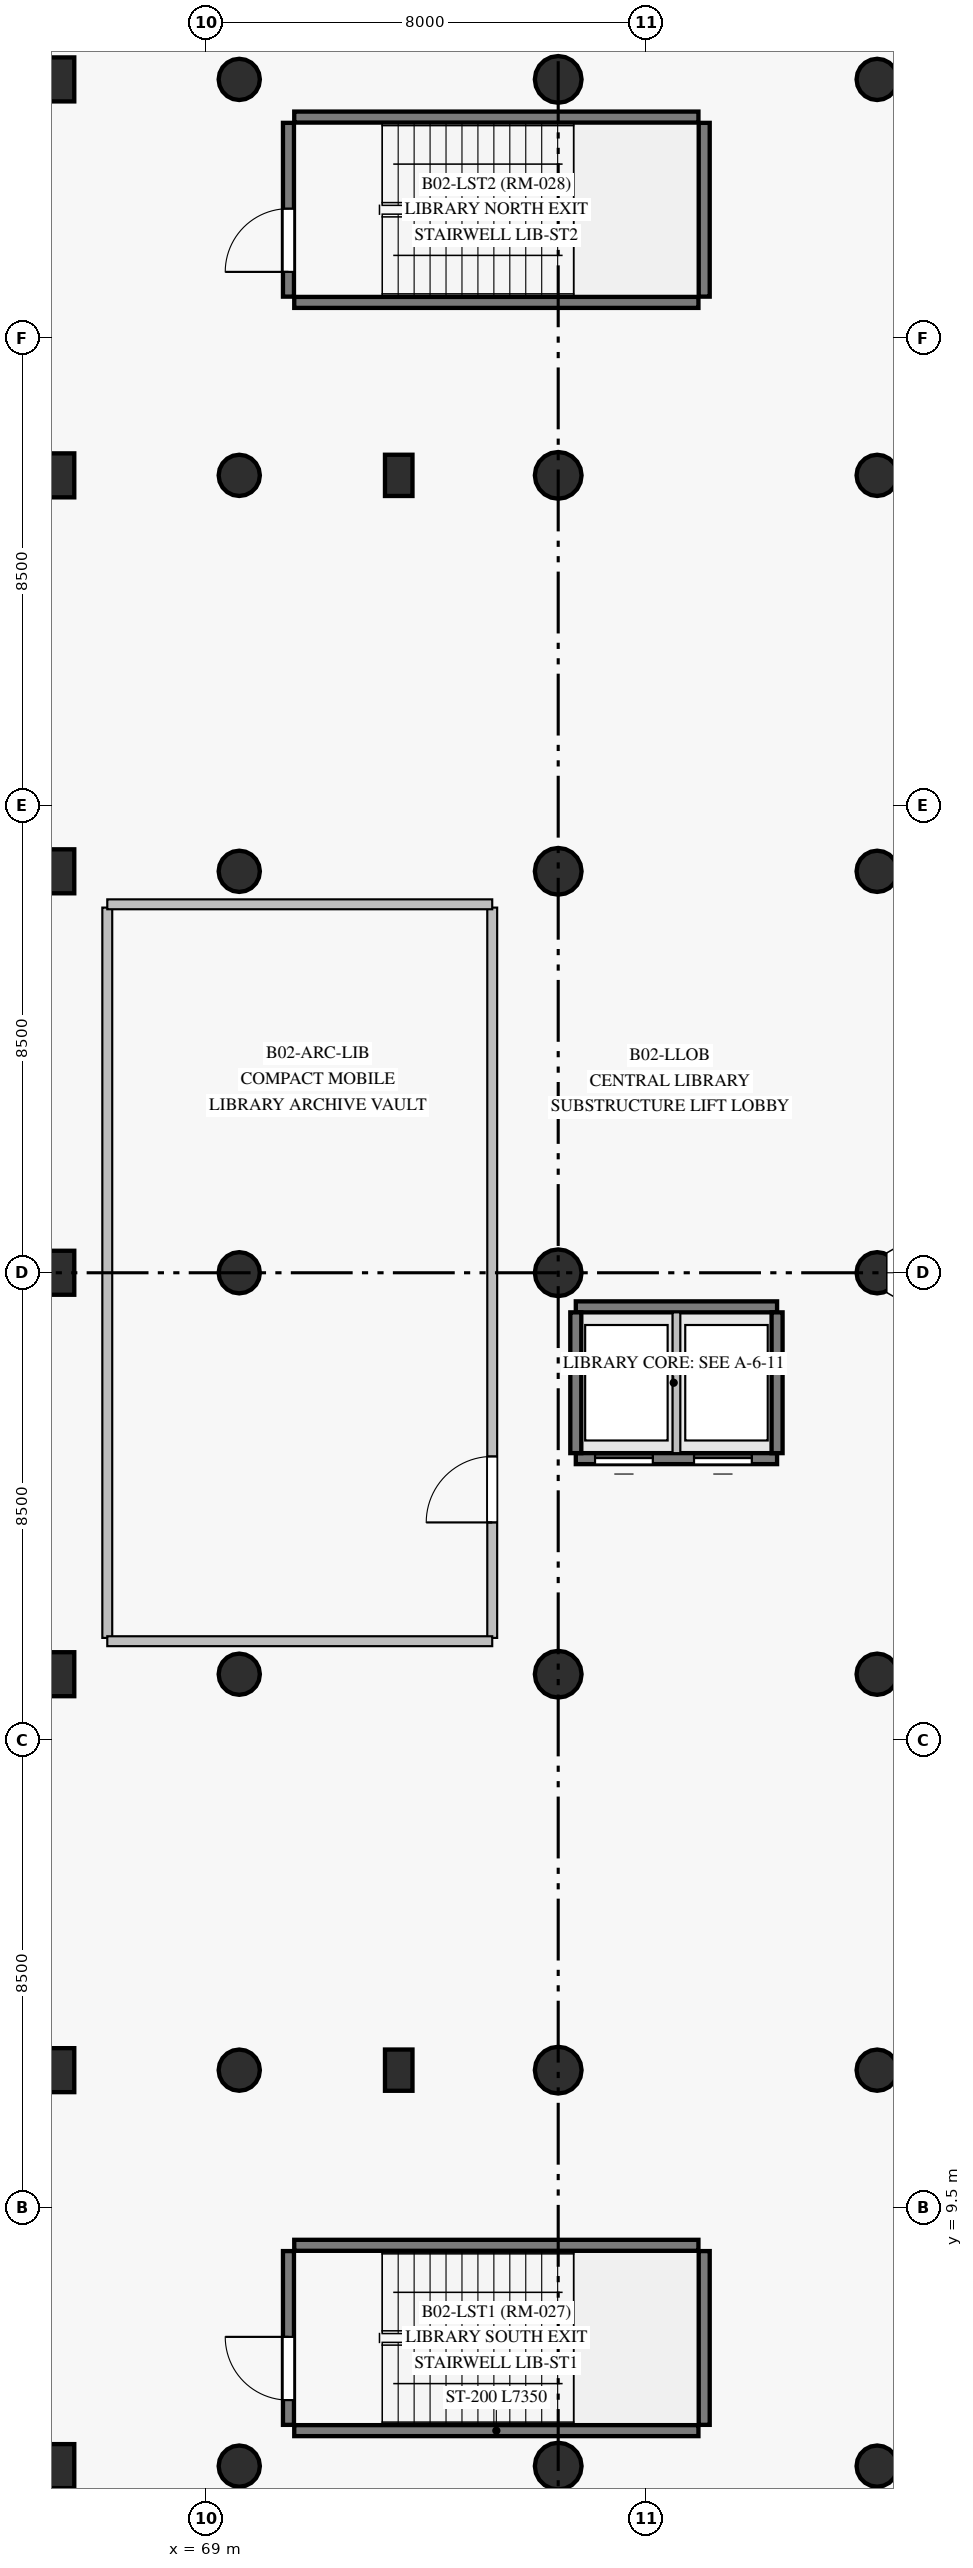
"""IFC4 building model, lengths in metres.
Left out: names, types, materials, properties, quantities, classifications, styles, units other than length and angle.
Written with IfcOpenShell. Run it as: python <this file> out.ifc"""

import sys

from ifc_helpers import new_model, si_unit, direction, frame, frame_2d, origin, origin_with_axes, origin_2d, place, context, subcontext, project, spatial, rectangle, circle, extrude, source, transform, mapped, element, fill, save


model = new_model("IFC4")
c1 = context("Model", 3, precision=1e-05, world=origin(), true_north=direction((0.0, 1.0)))
c2 = subcontext(c1, "Body", "Model", "MODEL_VIEW")
j1 = project(units=[si_unit("LENGTHUNIT", "METRE"), si_unit("PLANEANGLEUNIT", "RADIAN")], contexts=[c1])
p1 = place(None, origin())
s1 = spatial("IfcSite", under=j1, at=p1, CompositionType="ELEMENT")
p2 = place(p1, origin())
s2 = spatial("IfcBuilding", under=s1, at=p2, CompositionType="ELEMENT")
p3 = place(p2, frame((0.0, 0.0, -8.4)))
s3 = spatial("IfcBuildingStorey", under=s2, at=p3, CompositionType="ELEMENT", Elevation=-8.4)
m1 = source(origin_with_axes(), c2, "Body", "SweptSolid", [
    extrude(circle(Radius=0.375, at=origin_2d()), origin(), (0.0, 0.0, 1.0), 4.2),
])
for number, where, z_axis, x_axis in (
    (1, (69.6, 4.8, 0.0), (0.0, 0.0, 1.0), (1.0, 0.0, 0.0)),
    (2, (69.6, 12.0, 0.0), (0.0, 0.0, 1.0), (1.0, 0.0, 0.0)),
    (3, (69.6, 19.2, 0.0), (0.0, 0.0, 1.0), (1.0, 0.0, 0.0)),
    (4, (69.6, 26.5, 0.0), (0.0, 0.0, 1.0), (1.0, 0.0, 0.0)),
    (5, (69.6, 33.8, 0.0), (0.0, 0.0, 1.0), (1.0, 0.0, 0.0)),
    (6, (69.6, 41.0, 0.0), (0.0, 0.0, 1.0), (1.0, 0.0, 0.0)),
    (7, (69.6, 48.2, 0.0), (0.0, 0.0, 1.0), (1.0, 0.0, 0.0)),
):
    element("IfcColumn", number, at=place(p3, frame(where, z_axis=z_axis, x_axis=x_axis)), inside=s3, PredefinedType="COLUMN", context=c2, shape_type="MappedRepresentation", body=[
        mapped(m1, transform((0.0, 0.0, 0.0), scale=1.0)),
    ])
m2 = source(origin_with_axes(), c2, "Body", "SweptSolid", [
    extrude(circle(Radius=0.425, at=origin_2d()), origin(), (0.0, 0.0, 1.0), 4.2),
])
for number, where, z_axis, x_axis in (
    (8, (75.4, 4.8, 0.0), (0.0, 0.0, 1.0), (1.0, 0.0, 0.0)),
    (9, (75.4, 12.0, 0.0), (0.0, 0.0, 1.0), (1.0, 0.0, 0.0)),
    (10, (75.4, 19.2, 0.0), (0.0, 0.0, 1.0), (1.0, 0.0, 0.0)),
    (11, (75.4, 26.5, 0.0), (0.0, 0.0, 1.0), (1.0, 0.0, 0.0)),
    (12, (75.4, 33.8, 0.0), (0.0, 0.0, 1.0), (1.0, 0.0, 0.0)),
    (13, (75.4, 41.0, 0.0), (0.0, 0.0, 1.0), (1.0, 0.0, 0.0)),
    (14, (75.4, 48.2, 0.0), (0.0, 0.0, 1.0), (1.0, 0.0, 0.0)),
):
    element("IfcColumn", number, at=place(p3, frame(where, z_axis=z_axis, x_axis=x_axis)), inside=s3, PredefinedType="COLUMN", context=c2, shape_type="MappedRepresentation", body=[
        mapped(m2, transform((0.0, 0.0, 0.0), scale=1.0)),
    ])
for number, where, z_axis, x_axis in (
    (15, (81.2, 4.8, 0.0), (0.0, 0.0, 1.0), (1.0, 0.0, 0.0)),
    (16, (81.2, 12.0, 0.0), (0.0, 0.0, 1.0), (1.0, 0.0, 0.0)),
    (17, (81.2, 19.2, 0.0), (0.0, 0.0, 1.0), (1.0, 0.0, 0.0)),
    (18, (81.2, 26.5, 0.0), (0.0, 0.0, 1.0), (1.0, 0.0, 0.0)),
    (19, (81.2, 33.8, 0.0), (0.0, 0.0, 1.0), (1.0, 0.0, 0.0)),
    (20, (81.2, 41.0, 0.0), (0.0, 0.0, 1.0), (1.0, 0.0, 0.0)),
    (21, (81.2, 48.2, 0.0), (0.0, 0.0, 1.0), (1.0, 0.0, 0.0)),
):
    element("IfcColumn", number, at=place(p3, frame(where, z_axis=z_axis, x_axis=x_axis)), inside=s3, PredefinedType="COLUMN", context=c2, shape_type="MappedRepresentation", body=[
        mapped(m1, transform((0.0, 0.0, 0.0), scale=1.0)),
    ])
m3 = source(origin_with_axes(), c2, "Body", "SweptSolid", [
    extrude(rectangle(XDim=0.8, YDim=0.8, at=origin_2d()), origin(), (0.0, 0.0, 1.0), 4.2),
])
for number, where, z_axis, x_axis in (
    (22, (66.2, 4.8, 0.0), (0.0, 0.0, 1.0), (1.0, 0.0, 0.0)),
    (23, (66.2, 12.0, 0.0), (0.0, 0.0, 1.0), (1.0, 0.0, 0.0)),
    (24, (66.2, 19.2, 0.0), (0.0, 0.0, 1.0), (1.0, 0.0, 0.0)),
    (25, (66.2, 26.5, 0.0), (0.0, 0.0, 1.0), (1.0, 0.0, 0.0)),
    (26, (66.2, 33.8, 0.0), (0.0, 0.0, 1.0), (1.0, 0.0, 0.0)),
    (27, (66.2, 41.0, 0.0), (0.0, 0.0, 1.0), (1.0, 0.0, 0.0)),
    (28, (66.2, 48.2, 0.0), (0.0, 0.0, 1.0), (1.0, 0.0, 0.0)),
):
    element("IfcColumn", number, at=place(p3, frame(where, z_axis=z_axis, x_axis=x_axis)), inside=s3, PredefinedType="COLUMN", context=c2, shape_type="MappedRepresentation", body=[
        mapped(m3, transform((0.0, 0.0, 0.0), scale=1.0)),
    ])
m4 = source(origin_with_axes(), c2, "Body", "SweptSolid", [
    extrude(rectangle(XDim=0.5, YDim=0.75, at=origin_2d()), origin(), (0.0, 0.0, 1.0), 4.2),
])
for number, where, z_axis, x_axis in (
    (29, (72.5, 12.0, 0.0), (0.0, 0.0, 1.0), (1.0, 0.0, 0.0)),
    (30, (72.5, 41.0, 0.0), (0.0, 0.0, 1.0), (1.0, 0.0, 0.0)),
):
    element("IfcColumn", number, at=place(p3, frame(where, z_axis=z_axis, x_axis=x_axis)), inside=s3, PredefinedType="PILASTER", context=c2, shape_type="MappedRepresentation", body=[
        mapped(m4, transform((0.0, 0.0, 0.0), scale=1.0)),
    ])
for number, where, z_axis, x_axis in (
    (31, (70.6, 5.445, 0.0), (0.0, 0.0, 1.0), (1.0, 0.0, 0.0)),
    (32, (70.6, 8.815, 0.0), (0.0, 0.0, 1.0), (1.0, 0.0, 0.0)),
    (33, (70.6, 44.145, 0.0), (0.0, 0.0, 1.0), (1.0, 0.0, 0.0)),
    (34, (70.6, 47.515, 0.0), (0.0, 0.0, 1.0), (1.0, 0.0, 0.0)),
):
    element("IfcWall", number, at=place(p3, frame(where, z_axis=z_axis, x_axis=x_axis)), inside=s3, PredefinedType="SHEAR", context=c2, shape_type="SweptSolid", body=[
        extrude(rectangle(XDim=7.35, YDim=0.2, at=frame_2d((3.675, 0.0))), origin(), (0.0, 0.0, 1.0), 3.85),
    ])
p4 = place(p3, frame((75.72, 23.12, 0.0), z_axis=(0.0, 0.0, 1.0), x_axis=(1.0, 0.0, 0.0)))
e35 = element("IfcWall", 35, at=p4, inside=s3, PredefinedType="SHEAR", context=c2, shape_type="SweptSolid", body=[
    extrude(rectangle(XDim=3.66, YDim=0.2, at=frame_2d((1.83, 0.0))), origin(), (0.0, 0.0, 1.0), 3.85),
])
p5 = place(p4, frame((0.35, 0.0, 0.0)))
e36 = element("IfcOpeningElement", 36, at=p5, cuts=e35, PredefinedType="OPENING", context=c2, shape_type="SweptSolid", body=[
    extrude(rectangle(XDim=1.05, YDim=2.15, at=frame_2d((0.525, 1.075))), frame((0.0, 0.11, 0.0), z_axis=(0.0, -1.0, 0.0), x_axis=(1.0, 0.0, 0.0)), (0.0, 0.0, 1.0), 0.22),
])
p6 = place(p4, frame((2.15, 0.0, 0.0)))
e37 = element("IfcOpeningElement", 37, at=p6, cuts=e35, PredefinedType="OPENING", context=c2, shape_type="SweptSolid", body=[
    extrude(rectangle(XDim=1.05, YDim=2.15, at=frame_2d((0.525, 1.075))), frame((0.0, 0.11, 0.0), z_axis=(0.0, -1.0, 0.0), x_axis=(1.0, 0.0, 0.0)), (0.0, 0.0, 1.0), 0.22),
])
p7 = place(p3, frame((75.72, 25.88, 0.0), z_axis=(0.0, 0.0, 1.0), x_axis=(1.0, 0.0, 0.0)))
e38 = element("IfcWall", 38, at=p7, inside=s3, PredefinedType="SHEAR", context=c2, shape_type="SweptSolid", body=[
    extrude(rectangle(XDim=3.66, YDim=0.2, at=frame_2d((1.83, 0.0))), origin(), (0.0, 0.0, 1.0), 3.85),
])
p8 = place(p3, frame((70.495, 5.55, 0.0), z_axis=(0.0, 0.0, 1.0), x_axis=(0.0, 1.0, 0.0)))
e39 = element("IfcWall", 39, at=p8, inside=s3, PredefinedType="SHEAR", context=c2, shape_type="SweptSolid", body=[
    extrude(rectangle(XDim=3.16, YDim=0.2, at=frame_2d((1.58, 0.0))), origin(), (0.0, 0.0, 1.0), 3.85),
])
p9 = place(p8, frame((0.45, 0.0, 0.0)))
e40 = element("IfcOpeningElement", 40, at=p9, cuts=e39, PredefinedType="OPENING", context=c2, shape_type="SweptSolid", body=[
    extrude(rectangle(XDim=1.15, YDim=2.15, at=frame_2d((0.575, 1.075))), frame((0.0, 0.11, 0.0), z_axis=(0.0, -1.0, 0.0), x_axis=(1.0, 0.0, 0.0)), (0.0, 0.0, 1.0), 0.22),
])
p10 = place(p3, frame((78.055, 5.55, 0.0), z_axis=(0.0, 0.0, 1.0), x_axis=(0.0, 1.0, 0.0)))
e41 = element("IfcWall", 41, at=p10, inside=s3, PredefinedType="SHEAR", context=c2, shape_type="SweptSolid", body=[
    extrude(rectangle(XDim=3.16, YDim=0.2, at=frame_2d((1.58, 0.0))), origin(), (0.0, 0.0, 1.0), 3.85),
])
p11 = place(p3, frame((70.495, 44.25, 0.0), z_axis=(0.0, 0.0, 1.0), x_axis=(0.0, 1.0, 0.0)))
e42 = element("IfcWall", 42, at=p11, inside=s3, PredefinedType="SHEAR", context=c2, shape_type="SweptSolid", body=[
    extrude(rectangle(XDim=3.16, YDim=0.2, at=frame_2d((1.58, 0.0))), origin(), (0.0, 0.0, 1.0), 3.85),
])
p12 = place(p11, frame((0.45, 0.0, 0.0)))
e43 = element("IfcOpeningElement", 43, at=p12, cuts=e42, PredefinedType="OPENING", context=c2, shape_type="SweptSolid", body=[
    extrude(rectangle(XDim=1.15, YDim=2.15, at=frame_2d((0.575, 1.075))), frame((0.0, 0.11, 0.0), z_axis=(0.0, -1.0, 0.0), x_axis=(1.0, 0.0, 0.0)), (0.0, 0.0, 1.0), 0.22),
])
p13 = place(p3, frame((78.055, 44.25, 0.0), z_axis=(0.0, 0.0, 1.0), x_axis=(0.0, 1.0, 0.0)))
e44 = element("IfcWall", 44, at=p13, inside=s3, PredefinedType="SHEAR", context=c2, shape_type="SweptSolid", body=[
    extrude(rectangle(XDim=3.16, YDim=0.2, at=frame_2d((1.58, 0.0))), origin(), (0.0, 0.0, 1.0), 3.85),
])
for number, where, z_axis, x_axis in (
    (45, (75.72, 23.22, 0.0), (0.0, 0.0, 1.0), (0.0, 1.0, 0.0)),
    (46, (79.38, 23.22, 0.0), (0.0, 0.0, 1.0), (0.0, 1.0, 0.0)),
):
    element("IfcWall", number, at=place(p3, frame(where, z_axis=z_axis, x_axis=x_axis)), inside=s3, PredefinedType="SHEAR", context=c2, shape_type="SweptSolid", body=[
        extrude(rectangle(XDim=2.56, YDim=0.2, at=frame_2d((1.28, 0.0))), origin(), (0.0, 0.0, 1.0), 3.85),
    ])
p14 = place(p3, frame((67.2, 19.86, 0.0), z_axis=(0.0, 0.0, 1.0), x_axis=(0.0, 1.0, 0.0)))
e47 = element("IfcWall", 47, at=p14, inside=s3, PredefinedType="PARTITIONING", context=c2, shape_type="SweptSolid", body=[
    extrude(rectangle(XDim=13.28, YDim=0.18, at=frame_2d((6.64, 0.0))), origin(), (0.0, 0.0, 1.0), 3.85),
])
p15 = place(p3, frame((74.2, 19.86, 0.0), z_axis=(0.0, 0.0, 1.0), x_axis=(0.0, 1.0, 0.0)))
e48 = element("IfcWall", 48, at=p15, inside=s3, PredefinedType="PARTITIONING", context=c2, shape_type="SweptSolid", body=[
    extrude(rectangle(XDim=13.28, YDim=0.18, at=frame_2d((6.64, 0.0))), origin(), (0.0, 0.0, 1.0), 3.85),
])
p16 = place(p15, frame((2.1, 0.0, 0.0)))
e49 = element("IfcOpeningElement", 49, at=p16, cuts=e48, PredefinedType="OPENING", context=c2, shape_type="SweptSolid", body=[
    extrude(rectangle(XDim=1.2, YDim=2.15, at=frame_2d((0.6, 1.075))), frame((0.0, 0.1, 0.0), z_axis=(0.0, -1.0, 0.0), x_axis=(1.0, 0.0, 0.0)), (0.0, 0.0, 1.0), 0.2),
])
for number, where, z_axis, x_axis in (
    (50, (67.2, 33.2, 0.0), (0.0, 0.0, 1.0), (1.0, 0.0, 0.0)),
    (51, (67.2, 19.8, 0.0), (0.0, 0.0, 1.0), (1.0, 0.0, 0.0)),
):
    element("IfcWall", number, at=place(p3, frame(where, z_axis=z_axis, x_axis=x_axis)), inside=s3, PredefinedType="PARTITIONING", context=c2, shape_type="SweptSolid", body=[
        extrude(rectangle(XDim=7.0, YDim=0.18, at=frame_2d((3.5, 0.0))), origin(), (0.0, 0.0, 1.0), 3.2),
    ])
p17 = place(p3, frame((77.55, 23.22, 0.0), z_axis=(0.0, 0.0, 1.0), x_axis=(0.0, 1.0, 0.0)))
e52 = element("IfcWall", 52, at=p17, inside=s3, PredefinedType="PARTITIONING", context=c2, shape_type="SweptSolid", body=[
    extrude(rectangle(XDim=2.56, YDim=0.14, at=frame_2d((1.28, 0.0))), origin(), (0.0, 0.0, 1.0), 3.85),
])
m5 = source(origin_with_axes(), c2, "Body", "SweptSolid", [
    extrude(rectangle(XDim=1.2, YDim=2.15, at=frame_2d((0.6, 1.075))), frame((0.0, 0.025, 0.0), z_axis=(0.0, -1.0, 0.0), x_axis=(1.0, 0.0, 0.0)), (0.0, 0.0, 1.0), 0.05),
])
p18 = place(p16, origin())
e53 = element("IfcDoor", 53, at=p18, inside=s3, OperationType="SINGLE_SWING_LEFT", PredefinedType="DOOR", context=c2, shape_type="MappedRepresentation", body=[
    mapped(m5, transform((0.0, 0.0, 0.0), scale=1.0)),
])
fill(e49, e53)
m6 = source(origin_with_axes(), c2, "Body", "SweptSolid", [
    extrude(rectangle(XDim=1.15, YDim=2.15, at=frame_2d((0.575, 1.075))), frame((0.0, 0.025, 0.0), z_axis=(0.0, -1.0, 0.0), x_axis=(1.0, 0.0, 0.0)), (0.0, 0.0, 1.0), 0.05),
])
p19 = place(p9, origin())
e54 = element("IfcDoor", 54, at=p19, inside=s3, OperationType="SINGLE_SWING_RIGHT", PredefinedType="DOOR", context=c2, shape_type="MappedRepresentation", body=[
    mapped(m6, transform((0.0, 0.0, 0.0), scale=1.0)),
])
fill(e40, e54)
p20 = place(p12, origin())
e55 = element("IfcDoor", 55, at=p20, inside=s3, OperationType="SINGLE_SWING_LEFT", PredefinedType="DOOR", context=c2, shape_type="MappedRepresentation", body=[
    mapped(m6, transform((0.0, 0.0, 0.0), scale=1.0)),
])
fill(e43, e55)
m7 = source(origin_with_axes(), c2, "Body", "SweptSolid", [
    extrude(rectangle(XDim=1.05, YDim=2.15, at=frame_2d((0.525, 1.075))), frame((0.0, 0.025, 0.0), z_axis=(0.0, -1.0, 0.0), x_axis=(1.0, 0.0, 0.0)), (0.0, 0.0, 1.0), 0.05),
])
p21 = place(p5, origin())
e56 = element("IfcDoor", 56, at=p21, inside=s3, OperationType="SLIDING_TO_LEFT", PredefinedType="DOOR", context=c2, shape_type="MappedRepresentation", body=[
    mapped(m7, transform((0.0, 0.0, 0.0), scale=1.0)),
])
fill(e36, e56)
p22 = place(p6, origin())
e57 = element("IfcDoor", 57, at=p22, inside=s3, OperationType="SLIDING_TO_RIGHT", PredefinedType="DOOR", context=c2, shape_type="MappedRepresentation", body=[
    mapped(m7, transform((0.0, 0.0, 0.0), scale=1.0)),
])
fill(e37, e57)
save(model, sys.argv[1])
